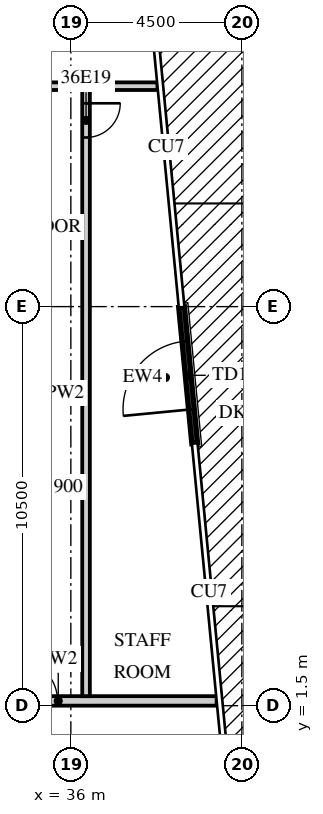
"""IFC4 building model, lengths in metres.
Left out: names, types, materials, properties, quantities, classifications, styles, units other than length and angle.
Written with IfcOpenShell. Run it as: python <this file> out.ifc"""

import sys

from ifc_helpers import new_model, si_unit, direction, frame, frame_2d, origin, place, context, subcontext, project, spatial, rectangle, extrude, element, fill, save


model = new_model("IFC4")
c1 = context("Model", 3, precision=1e-05, world=origin(), true_north=direction((0.0, 1.0)))
c2 = subcontext(c1, "Body", "Model", "MODEL_VIEW")
j1 = project(units=[si_unit("LENGTHUNIT", "METRE"), si_unit("PLANEANGLEUNIT", "RADIAN")], contexts=[c1])
p1 = place(None, origin())
s1 = spatial("IfcSite", under=j1, at=p1, CompositionType="ELEMENT")
p2 = place(p1, origin())
s2 = spatial("IfcBuilding", under=s1, at=p2, CompositionType="ELEMENT")
p3 = place(p2, frame((0.0, 0.0, 155.0)))
s3 = spatial("IfcBuildingStorey", under=s2, at=p3, CompositionType="ELEMENT", Elevation=155.0)
p4 = place(p3, frame((39.26, 8.401, 0.0), z_axis=(0.0, 0.0, 1.0), x_axis=(-0.095830004141, 0.995397714638, 0.0)))
e1 = element("IfcWall", 1, at=p4, inside=s3, PredefinedType="SOLIDWALL", context=c2, shape_type="SweptSolid", body=[
    extrude(rectangle(XDim=3.6, YDim=0.15, at=frame_2d((1.8, 0.0))), origin(), (0.0, 0.0, 1.0), 7.0),
])
p5 = place(p4, frame((0.9, 0.0, 0.0)))
e2 = element("IfcOpeningElement", 2, at=p5, cuts=e1, PredefinedType="OPENING", context=c2, shape_type="SweptSolid", body=[
    extrude(rectangle(XDim=1.8, YDim=2.4, at=frame_2d((0.9, 1.2))), frame((0.0, 0.085, 0.0), z_axis=(0.0, -1.0, 0.0), x_axis=(1.0, 0.0, 0.0)), (0.0, 0.0, 1.0), 0.17),
])
p6 = place(p3, frame((31.5, 1.625, 0.0), z_axis=(0.0, 0.0, 1.0), x_axis=(1.0, 0.0, 0.0)))
e3 = element("IfcWall", 3, at=p6, inside=s3, PredefinedType="PARTITIONING", context=c2, shape_type="SweptSolid", body=[
    extrude(rectangle(XDim=8.337, YDim=0.25, at=frame_2d((4.168, 0.0))), origin(), (0.0, 0.0, 1.0), 7.0),
])
p7 = place(p6, frame((0.625, 0.0, 0.0)))
e4 = element("IfcOpeningElement", 4, at=p7, cuts=e3, PredefinedType="OPENING", context=c2, shape_type="SweptSolid", body=[
    extrude(rectangle(XDim=1.3, YDim=2.1, at=frame_2d((0.65, 1.05))), frame((0.0, 0.135, 0.0), z_axis=(0.0, -1.0, 0.0), x_axis=(1.0, 0.0, 0.0)), (0.0, 0.0, 1.0), 0.27),
])
p8 = place(p6, frame((3.05, 0.0, 0.0)))
e5 = element("IfcOpeningElement", 5, at=p8, cuts=e3, PredefinedType="OPENING", context=c2, shape_type="SweptSolid", body=[
    extrude(rectangle(XDim=1.1, YDim=2.1, at=frame_2d((0.55, 1.05))), frame((0.0, 0.135, 0.0), z_axis=(0.0, -1.0, 0.0), x_axis=(1.0, 0.0, 0.0)), (0.0, 0.0, 1.0), 0.27),
])
p9 = place(p3, frame((36.4, 1.75, 0.0), z_axis=(0.0, 0.0, 1.0), x_axis=(0.0, 1.0, 0.0)))
e6 = element("IfcWall", 6, at=p9, inside=s3, PredefinedType="PARTITIONING", context=c2, shape_type="SweptSolid", body=[
    extrude(rectangle(XDim=15.95, YDim=0.2, at=frame_2d((7.975, 0.0))), origin(), (0.0, 0.0, 1.0), 7.0),
])
p10 = place(p9, frame((14.7, 0.0, 0.0)))
e7 = element("IfcOpeningElement", 7, at=p10, cuts=e6, PredefinedType="OPENING", context=c2, shape_type="SweptSolid", body=[
    extrude(rectangle(XDim=0.9, YDim=2.1, at=frame_2d((0.45, 1.05))), frame((0.0, 0.11, 0.0), z_axis=(0.0, -1.0, 0.0), x_axis=(1.0, 0.0, 0.0)), (0.0, 0.0, 1.0), 0.22),
])
p11 = place(p3, frame((13.6, 17.8, 0.0), z_axis=(0.0, 0.0, 1.0), x_axis=(1.0, 0.0, 0.0)))
e8 = element("IfcWall", 8, at=p11, inside=s3, PredefinedType="PARTITIONING", context=c2, shape_type="SweptSolid", body=[
    extrude(rectangle(XDim=24.679, YDim=0.2, at=frame_2d((12.34, 0.0))), origin(), (0.0, 0.0, 1.0), 7.0),
])
p12 = place(p11, frame((17.812, 0.0, 0.0)))
e9 = element("IfcOpeningElement", 9, at=p12, cuts=e8, PredefinedType="OPENING", context=c2, shape_type="SweptSolid", body=[
    extrude(rectangle(XDim=0.9, YDim=2.1, at=frame_2d((0.45, 1.05))), frame((0.0, 0.11, 0.0), z_axis=(0.0, -1.0, 0.0), x_axis=(1.0, 0.0, 0.0)), (0.0, 0.0, 1.0), 0.22),
])
p13 = place(p11, frame((9.512, 0.0, 0.0)))
e10 = element("IfcOpeningElement", 10, at=p13, cuts=e8, PredefinedType="OPENING", context=c2, shape_type="SweptSolid", body=[
    extrude(rectangle(XDim=0.9, YDim=2.1, at=frame_2d((0.45, 1.05))), frame((0.0, 0.11, 0.0), z_axis=(0.0, -1.0, 0.0), x_axis=(1.0, 0.0, 0.0)), (0.0, 0.0, 1.0), 0.22),
])
p14 = place(p5, origin())
e11 = element("IfcDoor", 11, at=p14, inside=s3, OperationType="SINGLE_SWING_LEFT", PredefinedType="DOOR", context=c2, shape_type="SweptSolid", body=[
    extrude(rectangle(XDim=1.8, YDim=2.4, at=frame_2d((0.9, 1.2))), frame((0.0, 0.025, 0.0), z_axis=(0.0, -1.0, 0.0), x_axis=(1.0, 0.0, 0.0)), (0.0, 0.0, 1.0), 0.05),
])
fill(e2, e11)
p15 = place(p8, origin())
e12 = element("IfcDoor", 12, at=p15, inside=s3, OperationType="SINGLE_SWING_LEFT", PredefinedType="DOOR", context=c2, shape_type="SweptSolid", body=[
    extrude(rectangle(XDim=1.1, YDim=2.1, at=frame_2d((0.55, 1.05))), frame((0.0, 0.025, 0.0), z_axis=(0.0, -1.0, 0.0), x_axis=(1.0, 0.0, 0.0)), (0.0, 0.0, 1.0), 0.05),
])
fill(e5, e12)
p16 = place(p10, origin())
e13 = element("IfcDoor", 13, at=p16, inside=s3, OperationType="SINGLE_SWING_RIGHT", PredefinedType="DOOR", context=c2, shape_type="SweptSolid", body=[
    extrude(rectangle(XDim=0.9, YDim=2.1, at=frame_2d((0.45, 1.05))), frame((0.0, 0.025, 0.0), z_axis=(0.0, -1.0, 0.0), x_axis=(1.0, 0.0, 0.0)), (0.0, 0.0, 1.0), 0.05),
])
fill(e7, e13)
save(model, sys.argv[1])
